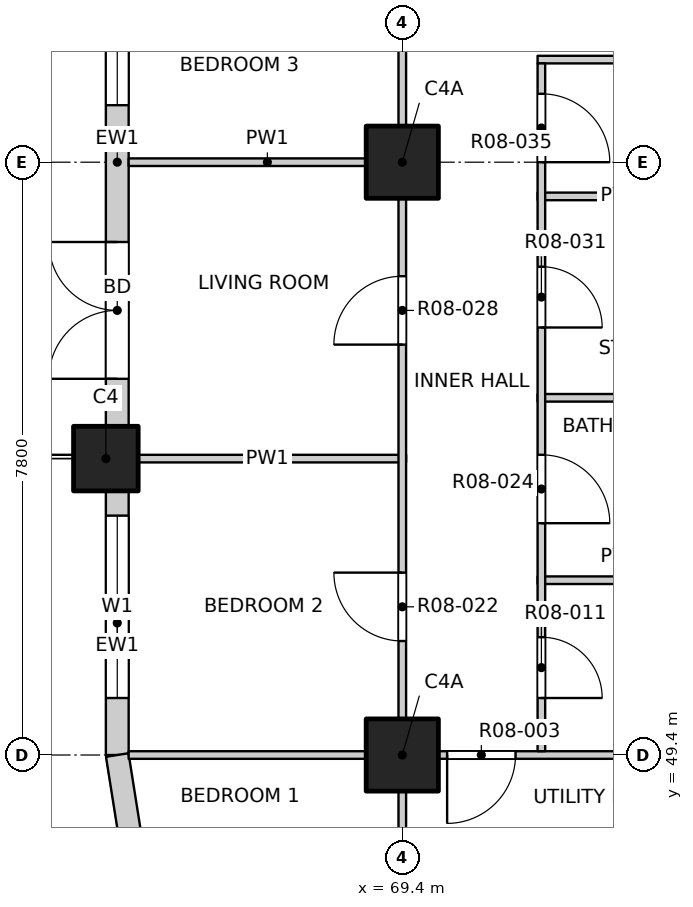
"""IFC4 building model, lengths in metres.
Left out: names, types, materials, properties, quantities, classifications, styles, units other than length and angle.
Written with IfcOpenShell. Run it as: python <this file> out.ifc"""

import sys

from ifc_helpers import new_model, si_unit, direction, frame, frame_2d, origin, origin_2d, place, context, subcontext, project, spatial, rectangle, extrude, element, fill, save


model = new_model("IFC4")
c1 = context("Model", 3, precision=1e-05, world=origin(), true_north=direction((0.0, 1.0)))
c2 = subcontext(c1, "Body", "Model", "MODEL_VIEW")
j1 = project(units=[si_unit("LENGTHUNIT", "METRE"), si_unit("PLANEANGLEUNIT", "RADIAN")], contexts=[c1])
p1 = place(None, origin())
s1 = spatial("IfcSite", under=j1, at=p1, CompositionType="ELEMENT")
p2 = place(p1, origin())
s2 = spatial("IfcBuilding", under=s1, at=p2, CompositionType="ELEMENT")
p3 = place(p2, frame((0.0, 0.0, 103.3)))
s3 = spatial("IfcBuildingStorey", under=s2, at=p3, CompositionType="ELEMENT", Elevation=103.3)
p4 = place(p3, frame((65.5, 53.3, -0.25), z_axis=(0.0, 0.0, 1.0), x_axis=(1.0, 0.0, 0.0)))
e1 = element("IfcColumn", 1, at=p4, inside=s3, PredefinedType="COLUMN", context=c2, shape_type="SweptSolid", body=[
    extrude(rectangle(XDim=0.85, YDim=0.85, at=origin_2d()), origin(), (0.0, 0.0, 1.0), 3.4),
])
for number, where, z_axis, x_axis in (
    (2, (69.4, 49.4, -0.25), (0.0, 0.0, 1.0), (1.0, 0.0, 0.0)),
    (3, (69.4, 57.2, -0.25), (0.0, 0.0, 1.0), (1.0, 0.0, 0.0)),
):
    element("IfcColumn", number, at=place(p3, frame(where, z_axis=z_axis, x_axis=x_axis)), inside=s3, PredefinedType="COLUMN", context=c2, shape_type="SweptSolid", body=[
        extrude(rectangle(XDim=0.95, YDim=0.95, at=origin_2d()), origin(), (0.0, 0.0, 1.0), 3.4),
    ])
p5 = place(p3, frame((65.65, 49.4, 0.0), z_axis=(0.0, 0.0, 1.0), x_axis=(0.0, 1.0, 0.0)))
e4 = element("IfcWall", 4, at=p5, inside=s3, PredefinedType="SOLIDWALL", context=c2, shape_type="SweptSolid", body=[
    extrude(rectangle(XDim=3.475, YDim=0.3, at=frame_2d((1.738, 0.0))), origin(), (0.0, 0.0, 1.0), 2.7),
])
p6 = place(p5, frame((0.75, 0.0, 0.9)))
e5 = element("IfcOpeningElement", 5, at=p6, cuts=e4, PredefinedType="OPENING", context=c2, shape_type="SweptSolid", body=[
    extrude(rectangle(XDim=2.4, YDim=1.8, at=frame_2d((1.2, 0.9))), frame((0.0, 0.16, 0.0), z_axis=(0.0, -1.0, 0.0), x_axis=(1.0, 0.0, 0.0)), (0.0, 0.0, 1.0), 0.32),
])
p7 = place(p3, frame((65.65, 53.725, 0.0), z_axis=(0.0, 0.0, 1.0), x_axis=(0.0, 1.0, 0.0)))
e6 = element("IfcWall", 6, at=p7, inside=s3, PredefinedType="SOLIDWALL", context=c2, shape_type="SweptSolid", body=[
    extrude(rectangle(XDim=6.95, YDim=0.3, at=frame_2d((3.475, 0.0))), origin(), (0.0, 0.0, 1.0), 2.7),
])
p8 = place(p7, frame((0.625, 0.0, 0.0)))
e7 = element("IfcOpeningElement", 7, at=p8, cuts=e6, PredefinedType="OPENING", context=c2, shape_type="SweptSolid", body=[
    extrude(rectangle(XDim=1.8, YDim=2.4, at=frame_2d((0.9, 1.2))), frame((0.0, 0.16, 0.0), z_axis=(0.0, -1.0, 0.0), x_axis=(1.0, 0.0, 0.0)), (0.0, 0.0, 1.0), 0.32),
])
p9 = place(p7, frame((4.225, 0.0, 0.9)))
e8 = element("IfcOpeningElement", 8, at=p9, cuts=e6, PredefinedType="OPENING", context=c2, shape_type="SweptSolid", body=[
    extrude(rectangle(XDim=2.4, YDim=1.8, at=frame_2d((1.2, 0.9))), frame((0.0, 0.16, 0.0), z_axis=(0.0, -1.0, 0.0), x_axis=(1.0, 0.0, 0.0)), (0.0, 0.0, 1.0), 0.32),
])
p10 = place(p3, frame((65.65, 49.4, 0.0), z_axis=(0.0, 0.0, 1.0), x_axis=(0.156496880861, -0.987678452879, 0.0)))
e9 = element("IfcWall", 9, at=p10, inside=s3, PredefinedType="SOLIDWALL", context=c2, shape_type="SweptSolid", body=[
    extrude(rectangle(XDim=1.173, YDim=0.3, at=frame_2d((0.586, 0.0))), origin(), (0.0, 0.0, 1.0), 2.7),
])
p11 = place(p3, frame((65.8, 49.4, 0.0), z_axis=(0.0, 0.0, 1.0), x_axis=(1.0, 0.0, 0.0)))
e10 = element("IfcWall", 10, at=p11, inside=s3, PredefinedType="PARTITIONING", context=c2, shape_type="SweptSolid", body=[
    extrude(rectangle(XDim=38.4, YDim=0.1, at=frame_2d((19.2, 0.0))), origin(), (0.0, 0.0, 1.0), 3.15),
])
p12 = place(p11, frame((4.19, 0.0, 0.0)))
e11 = element("IfcOpeningElement", 11, at=p12, cuts=e10, PredefinedType="OPENING", context=c2, shape_type="SweptSolid", body=[
    extrude(rectangle(XDim=0.9, YDim=2.1, at=frame_2d((0.45, 1.05))), frame((0.0, 0.06, 0.0), z_axis=(0.0, -1.0, 0.0), x_axis=(1.0, 0.0, 0.0)), (0.0, 0.0, 1.0), 0.12),
])
p13 = place(p11, frame((9.0, 0.0, 0.0)))
e12 = element("IfcOpeningElement", 12, at=p13, cuts=e10, PredefinedType="OPENING", context=c2, shape_type="SweptSolid", body=[
    extrude(rectangle(XDim=0.9, YDim=2.1, at=frame_2d((0.45, 1.05))), frame((0.0, 0.06, 0.0), z_axis=(0.0, -1.0, 0.0), x_axis=(1.0, 0.0, 0.0)), (0.0, 0.0, 1.0), 0.12),
])
p14 = place(p11, frame((12.9, 0.0, 0.0)))
e13 = element("IfcOpeningElement", 13, at=p14, cuts=e10, PredefinedType="OPENING", context=c2, shape_type="SweptSolid", body=[
    extrude(rectangle(XDim=0.9, YDim=2.1, at=frame_2d((0.45, 1.05))), frame((0.0, 0.06, 0.0), z_axis=(0.0, -1.0, 0.0), x_axis=(1.0, 0.0, 0.0)), (0.0, 0.0, 1.0), 0.12),
])
p15 = place(p11, frame((16.8, 0.0, 0.0)))
e14 = element("IfcOpeningElement", 14, at=p15, cuts=e10, PredefinedType="OPENING", context=c2, shape_type="SweptSolid", body=[
    extrude(rectangle(XDim=0.9, YDim=2.1, at=frame_2d((0.45, 1.05))), frame((0.0, 0.06, 0.0), z_axis=(0.0, -1.0, 0.0), x_axis=(1.0, 0.0, 0.0)), (0.0, 0.0, 1.0), 0.12),
])
p16 = place(p11, frame((20.7, 0.0, 0.0)))
e15 = element("IfcOpeningElement", 15, at=p16, cuts=e10, PredefinedType="OPENING", context=c2, shape_type="SweptSolid", body=[
    extrude(rectangle(XDim=0.9, YDim=2.1, at=frame_2d((0.45, 1.05))), frame((0.0, 0.06, 0.0), z_axis=(0.0, -1.0, 0.0), x_axis=(1.0, 0.0, 0.0)), (0.0, 0.0, 1.0), 0.12),
])
p17 = place(p11, frame((24.6, 0.0, 0.0)))
e16 = element("IfcOpeningElement", 16, at=p17, cuts=e10, PredefinedType="OPENING", context=c2, shape_type="SweptSolid", body=[
    extrude(rectangle(XDim=0.9, YDim=2.1, at=frame_2d((0.45, 1.05))), frame((0.0, 0.06, 0.0), z_axis=(0.0, -1.0, 0.0), x_axis=(1.0, 0.0, 0.0)), (0.0, 0.0, 1.0), 0.12),
])
p18 = place(p11, frame((28.5, 0.0, 0.0)))
e17 = element("IfcOpeningElement", 17, at=p18, cuts=e10, PredefinedType="OPENING", context=c2, shape_type="SweptSolid", body=[
    extrude(rectangle(XDim=0.9, YDim=2.1, at=frame_2d((0.45, 1.05))), frame((0.0, 0.06, 0.0), z_axis=(0.0, -1.0, 0.0), x_axis=(1.0, 0.0, 0.0)), (0.0, 0.0, 1.0), 0.12),
])
p19 = place(p11, frame((33.31, 0.0, 0.0)))
e18 = element("IfcOpeningElement", 18, at=p19, cuts=e10, PredefinedType="OPENING", context=c2, shape_type="SweptSolid", body=[
    extrude(rectangle(XDim=0.9, YDim=2.1, at=frame_2d((0.45, 1.05))), frame((0.0, 0.06, 0.0), z_axis=(0.0, -1.0, 0.0), x_axis=(1.0, 0.0, 0.0)), (0.0, 0.0, 1.0), 0.12),
])
p20 = place(p3, frame((71.18, 51.7, 0.0), z_axis=(0.0, 0.0, 1.0), x_axis=(1.0, 0.0, 0.0)))
e19 = element("IfcWall", 19, at=p20, inside=s3, PredefinedType="PARTITIONING", context=c2, shape_type="SweptSolid", body=[
    extrude(rectangle(XDim=2.22, YDim=0.1, at=frame_2d((1.11, 0.0))), origin(), (0.0, 0.0, 1.0), 3.15),
])
p21 = place(p3, frame((65.8, 53.3, 0.0), z_axis=(0.0, 0.0, 1.0), x_axis=(1.0, 0.0, 0.0)))
e20 = element("IfcWall", 20, at=p21, inside=s3, PredefinedType="PARTITIONING", context=c2, shape_type="SweptSolid", body=[
    extrude(rectangle(XDim=3.65, YDim=0.1, at=frame_2d((1.825, 0.0))), origin(), (0.0, 0.0, 1.0), 3.15),
])
for number, where, z_axis, x_axis in (
    (21, (71.18, 54.1, 0.0), (0.0, 0.0, 1.0), (1.0, 0.0, 0.0)),
    (22, (71.18, 56.75, 0.0), (0.0, 0.0, 1.0), (1.0, 0.0, 0.0)),
):
    element("IfcWall", number, at=place(p3, frame(where, z_axis=z_axis, x_axis=x_axis)), inside=s3, PredefinedType="PARTITIONING", context=c2, shape_type="SweptSolid", body=[
        extrude(rectangle(XDim=2.22, YDim=0.1, at=frame_2d((1.11, 0.0))), origin(), (0.0, 0.0, 1.0), 3.15),
    ])
p22 = place(p3, frame((65.8, 57.2, 0.0), z_axis=(0.0, 0.0, 1.0), x_axis=(1.0, 0.0, 0.0)))
e23 = element("IfcWall", 23, at=p22, inside=s3, PredefinedType="PARTITIONING", context=c2, shape_type="SweptSolid", body=[
    extrude(rectangle(XDim=3.65, YDim=0.1, at=frame_2d((1.825, 0.0))), origin(), (0.0, 0.0, 1.0), 3.15),
])
p23 = place(p3, frame((71.18, 58.55, 0.0), z_axis=(0.0, 0.0, 1.0), x_axis=(1.0, 0.0, 0.0)))
e24 = element("IfcWall", 24, at=p23, inside=s3, PredefinedType="PARTITIONING", context=c2, shape_type="SweptSolid", body=[
    extrude(rectangle(XDim=2.22, YDim=0.1, at=frame_2d((1.11, 0.0))), origin(), (0.0, 0.0, 1.0), 3.15),
])
p24 = place(p3, frame((69.4, 45.8, 0.0), z_axis=(0.0, 0.0, 1.0), x_axis=(0.0, 1.0, 0.0)))
e25 = element("IfcWall", 25, at=p24, inside=s3, PredefinedType="PARTITIONING", context=c2, shape_type="SweptSolid", body=[
    extrude(rectangle(XDim=38.4, YDim=0.1, at=frame_2d((19.2, 0.0))), origin(), (0.0, 0.0, 1.0), 3.15),
])
p25 = place(p24, frame((1.05, 0.0, 0.0)))
e26 = element("IfcOpeningElement", 26, at=p25, cuts=e25, PredefinedType="OPENING", context=c2, shape_type="SweptSolid", body=[
    extrude(rectangle(XDim=1.2, YDim=2.1, at=frame_2d((0.6, 1.05))), frame((0.0, 0.06, 0.0), z_axis=(0.0, -1.0, 0.0), x_axis=(1.0, 0.0, 0.0)), (0.0, 0.0, 1.0), 0.12),
])
p26 = place(p24, frame((5.1, 0.0, 0.0)))
e27 = element("IfcOpeningElement", 27, at=p26, cuts=e25, PredefinedType="OPENING", context=c2, shape_type="SweptSolid", body=[
    extrude(rectangle(XDim=0.9, YDim=2.1, at=frame_2d((0.45, 1.05))), frame((0.0, 0.06, 0.0), z_axis=(0.0, -1.0, 0.0), x_axis=(1.0, 0.0, 0.0)), (0.0, 0.0, 1.0), 0.12),
])
p27 = place(p24, frame((9.0, 0.0, 0.0)))
e28 = element("IfcOpeningElement", 28, at=p27, cuts=e25, PredefinedType="OPENING", context=c2, shape_type="SweptSolid", body=[
    extrude(rectangle(XDim=0.9, YDim=2.1, at=frame_2d((0.45, 1.05))), frame((0.0, 0.06, 0.0), z_axis=(0.0, -1.0, 0.0), x_axis=(1.0, 0.0, 0.0)), (0.0, 0.0, 1.0), 0.12),
])
p28 = place(p24, frame((12.9, 0.0, 0.0)))
e29 = element("IfcOpeningElement", 29, at=p28, cuts=e25, PredefinedType="OPENING", context=c2, shape_type="SweptSolid", body=[
    extrude(rectangle(XDim=0.9, YDim=2.1, at=frame_2d((0.45, 1.05))), frame((0.0, 0.06, 0.0), z_axis=(0.0, -1.0, 0.0), x_axis=(1.0, 0.0, 0.0)), (0.0, 0.0, 1.0), 0.12),
])
p29 = place(p24, frame((16.8, 0.0, 0.0)))
e30 = element("IfcOpeningElement", 30, at=p29, cuts=e25, PredefinedType="OPENING", context=c2, shape_type="SweptSolid", body=[
    extrude(rectangle(XDim=0.9, YDim=2.1, at=frame_2d((0.45, 1.05))), frame((0.0, 0.06, 0.0), z_axis=(0.0, -1.0, 0.0), x_axis=(1.0, 0.0, 0.0)), (0.0, 0.0, 1.0), 0.12),
])
p30 = place(p24, frame((20.7, 0.0, 0.0)))
e31 = element("IfcOpeningElement", 31, at=p30, cuts=e25, PredefinedType="OPENING", context=c2, shape_type="SweptSolid", body=[
    extrude(rectangle(XDim=0.9, YDim=2.1, at=frame_2d((0.45, 1.05))), frame((0.0, 0.06, 0.0), z_axis=(0.0, -1.0, 0.0), x_axis=(1.0, 0.0, 0.0)), (0.0, 0.0, 1.0), 0.12),
])
p31 = place(p24, frame((24.6, 0.0, 0.0)))
e32 = element("IfcOpeningElement", 32, at=p31, cuts=e25, PredefinedType="OPENING", context=c2, shape_type="SweptSolid", body=[
    extrude(rectangle(XDim=0.9, YDim=2.1, at=frame_2d((0.45, 1.05))), frame((0.0, 0.06, 0.0), z_axis=(0.0, -1.0, 0.0), x_axis=(1.0, 0.0, 0.0)), (0.0, 0.0, 1.0), 0.12),
])
p32 = place(p24, frame((28.5, 0.0, 0.0)))
e33 = element("IfcOpeningElement", 33, at=p32, cuts=e25, PredefinedType="OPENING", context=c2, shape_type="SweptSolid", body=[
    extrude(rectangle(XDim=0.9, YDim=2.1, at=frame_2d((0.45, 1.05))), frame((0.0, 0.06, 0.0), z_axis=(0.0, -1.0, 0.0), x_axis=(1.0, 0.0, 0.0)), (0.0, 0.0, 1.0), 0.12),
])
p33 = place(p24, frame((32.4, 0.0, 0.0)))
e34 = element("IfcOpeningElement", 34, at=p33, cuts=e25, PredefinedType="OPENING", context=c2, shape_type="SweptSolid", body=[
    extrude(rectangle(XDim=0.9, YDim=2.1, at=frame_2d((0.45, 1.05))), frame((0.0, 0.06, 0.0), z_axis=(0.0, -1.0, 0.0), x_axis=(1.0, 0.0, 0.0)), (0.0, 0.0, 1.0), 0.12),
])
p34 = place(p24, frame((36.15, 0.0, 0.0)))
e35 = element("IfcOpeningElement", 35, at=p34, cuts=e25, PredefinedType="OPENING", context=c2, shape_type="SweptSolid", body=[
    extrude(rectangle(XDim=1.2, YDim=2.1, at=frame_2d((0.6, 1.05))), frame((0.0, 0.06, 0.0), z_axis=(0.0, -1.0, 0.0), x_axis=(1.0, 0.0, 0.0)), (0.0, 0.0, 1.0), 0.12),
])
p35 = place(p3, frame((71.23, 49.45, 0.0), z_axis=(0.0, 0.0, 1.0), x_axis=(0.0, 1.0, 0.0)))
e36 = element("IfcWall", 36, at=p35, inside=s3, PredefinedType="PARTITIONING", context=c2, shape_type="SweptSolid", body=[
    extrude(rectangle(XDim=9.05, YDim=0.1, at=frame_2d((4.525, 0.0))), origin(), (0.0, 0.0, 1.0), 3.15),
])
p36 = place(p35, frame((0.7, 0.0, 0.0)))
e37 = element("IfcOpeningElement", 37, at=p36, cuts=e36, PredefinedType="OPENING", context=c2, shape_type="SweptSolid", body=[
    extrude(rectangle(XDim=0.8, YDim=2.1, at=frame_2d((0.4, 1.05))), frame((0.0, 0.06, 0.0), z_axis=(0.0, -1.0, 0.0), x_axis=(1.0, 0.0, 0.0)), (0.0, 0.0, 1.0), 0.12),
])
p37 = place(p35, frame((3.0, 0.0, 0.0)))
e38 = element("IfcOpeningElement", 38, at=p37, cuts=e36, PredefinedType="OPENING", context=c2, shape_type="SweptSolid", body=[
    extrude(rectangle(XDim=0.9, YDim=2.1, at=frame_2d((0.45, 1.05))), frame((0.0, 0.06, 0.0), z_axis=(0.0, -1.0, 0.0), x_axis=(1.0, 0.0, 0.0)), (0.0, 0.0, 1.0), 0.12),
])
p38 = place(p35, frame((5.575, 0.0, 0.0)))
e39 = element("IfcOpeningElement", 39, at=p38, cuts=e36, PredefinedType="OPENING", context=c2, shape_type="SweptSolid", body=[
    extrude(rectangle(XDim=0.8, YDim=2.1, at=frame_2d((0.4, 1.05))), frame((0.0, 0.06, 0.0), z_axis=(0.0, -1.0, 0.0), x_axis=(1.0, 0.0, 0.0)), (0.0, 0.0, 1.0), 0.12),
])
p39 = place(p35, frame((7.75, 0.0, 0.0)))
e40 = element("IfcOpeningElement", 40, at=p39, cuts=e36, PredefinedType="OPENING", context=c2, shape_type="SweptSolid", body=[
    extrude(rectangle(XDim=0.9, YDim=2.1, at=frame_2d((0.45, 1.05))), frame((0.0, 0.06, 0.0), z_axis=(0.0, -1.0, 0.0), x_axis=(1.0, 0.0, 0.0)), (0.0, 0.0, 1.0), 0.12),
])
p40 = place(p6, origin())
e41 = element("IfcWindow", 41, at=p40, inside=s3, PartitioningType="DOUBLE_PANEL_VERTICAL", PredefinedType="WINDOW", context=c2, shape_type="SweptSolid", body=[
    extrude(rectangle(XDim=2.4, YDim=1.8, at=frame_2d((1.2, 0.9))), frame((0.0, 0.03, 0.0), z_axis=(0.0, -1.0, 0.0), x_axis=(1.0, 0.0, 0.0)), (0.0, 0.0, 1.0), 0.06),
])
fill(e5, e41)
p41 = place(p8, origin())
e42 = element("IfcDoor", 42, at=p41, inside=s3, OperationType="DOUBLE_DOOR_SINGLE_SWING", PredefinedType="DOOR", context=c2, shape_type="SweptSolid", body=[
    extrude(rectangle(XDim=1.8, YDim=2.4, at=frame_2d((0.9, 1.2))), frame((0.0, 0.025, 0.0), z_axis=(0.0, -1.0, 0.0), x_axis=(1.0, 0.0, 0.0)), (0.0, 0.0, 1.0), 0.05),
])
fill(e7, e42)
p42 = place(p9, origin())
e43 = element("IfcWindow", 43, at=p42, inside=s3, PartitioningType="DOUBLE_PANEL_VERTICAL", PredefinedType="WINDOW", context=c2, shape_type="SweptSolid", body=[
    extrude(rectangle(XDim=2.4, YDim=1.8, at=frame_2d((1.2, 0.9))), frame((0.0, 0.03, 0.0), z_axis=(0.0, -1.0, 0.0), x_axis=(1.0, 0.0, 0.0)), (0.0, 0.0, 1.0), 0.06),
])
fill(e8, e43)
p43 = place(p12, origin())
e44 = element("IfcDoor", 44, at=p43, inside=s3, OperationType="SINGLE_SWING_RIGHT", PredefinedType="DOOR", context=c2, shape_type="SweptSolid", body=[
    extrude(rectangle(XDim=0.9, YDim=2.1, at=frame_2d((0.45, 1.05))), frame((0.0, 0.025, 0.0), z_axis=(0.0, -1.0, 0.0), x_axis=(1.0, 0.0, 0.0)), (0.0, 0.0, 1.0), 0.05),
])
fill(e11, e44)
p44 = place(p36, origin())
e45 = element("IfcDoor", 45, at=p44, inside=s3, OperationType="SINGLE_SWING_RIGHT", PredefinedType="DOOR", context=c2, shape_type="SweptSolid", body=[
    extrude(rectangle(XDim=0.8, YDim=2.1, at=frame_2d((0.4, 1.05))), frame((0.0, 0.025, 0.0), z_axis=(0.0, -1.0, 0.0), x_axis=(1.0, 0.0, 0.0)), (0.0, 0.0, 1.0), 0.05),
])
fill(e37, e45)
p45 = place(p26, origin())
e46 = element("IfcDoor", 46, at=p45, inside=s3, OperationType="SINGLE_SWING_RIGHT", PredefinedType="DOOR", context=c2, shape_type="SweptSolid", body=[
    extrude(rectangle(XDim=0.9, YDim=2.1, at=frame_2d((0.45, 1.05))), frame((0.0, 0.025, 0.0), z_axis=(0.0, -1.0, 0.0), x_axis=(1.0, 0.0, 0.0)), (0.0, 0.0, 1.0), 0.05),
])
fill(e27, e46)
p46 = place(p37, origin())
e47 = element("IfcDoor", 47, at=p46, inside=s3, OperationType="SINGLE_SWING_RIGHT", PredefinedType="DOOR", context=c2, shape_type="SweptSolid", body=[
    extrude(rectangle(XDim=0.9, YDim=2.1, at=frame_2d((0.45, 1.05))), frame((0.0, 0.025, 0.0), z_axis=(0.0, -1.0, 0.0), x_axis=(1.0, 0.0, 0.0)), (0.0, 0.0, 1.0), 0.05),
])
fill(e38, e47)
p47 = place(p27, origin())
e48 = element("IfcDoor", 48, at=p47, inside=s3, OperationType="SINGLE_SWING_LEFT", PredefinedType="DOOR", context=c2, shape_type="SweptSolid", body=[
    extrude(rectangle(XDim=0.9, YDim=2.1, at=frame_2d((0.45, 1.05))), frame((0.0, 0.025, 0.0), z_axis=(0.0, -1.0, 0.0), x_axis=(1.0, 0.0, 0.0)), (0.0, 0.0, 1.0), 0.05),
])
fill(e28, e48)
p48 = place(p38, origin())
e49 = element("IfcDoor", 49, at=p48, inside=s3, OperationType="SINGLE_SWING_RIGHT", PredefinedType="DOOR", context=c2, shape_type="SweptSolid", body=[
    extrude(rectangle(XDim=0.8, YDim=2.1, at=frame_2d((0.4, 1.05))), frame((0.0, 0.025, 0.0), z_axis=(0.0, -1.0, 0.0), x_axis=(1.0, 0.0, 0.0)), (0.0, 0.0, 1.0), 0.05),
])
fill(e39, e49)
p49 = place(p39, origin())
e50 = element("IfcDoor", 50, at=p49, inside=s3, OperationType="SINGLE_SWING_RIGHT", PredefinedType="DOOR", context=c2, shape_type="SweptSolid", body=[
    extrude(rectangle(XDim=0.9, YDim=2.1, at=frame_2d((0.45, 1.05))), frame((0.0, 0.025, 0.0), z_axis=(0.0, -1.0, 0.0), x_axis=(1.0, 0.0, 0.0)), (0.0, 0.0, 1.0), 0.05),
])
fill(e40, e50)
save(model, sys.argv[1])
